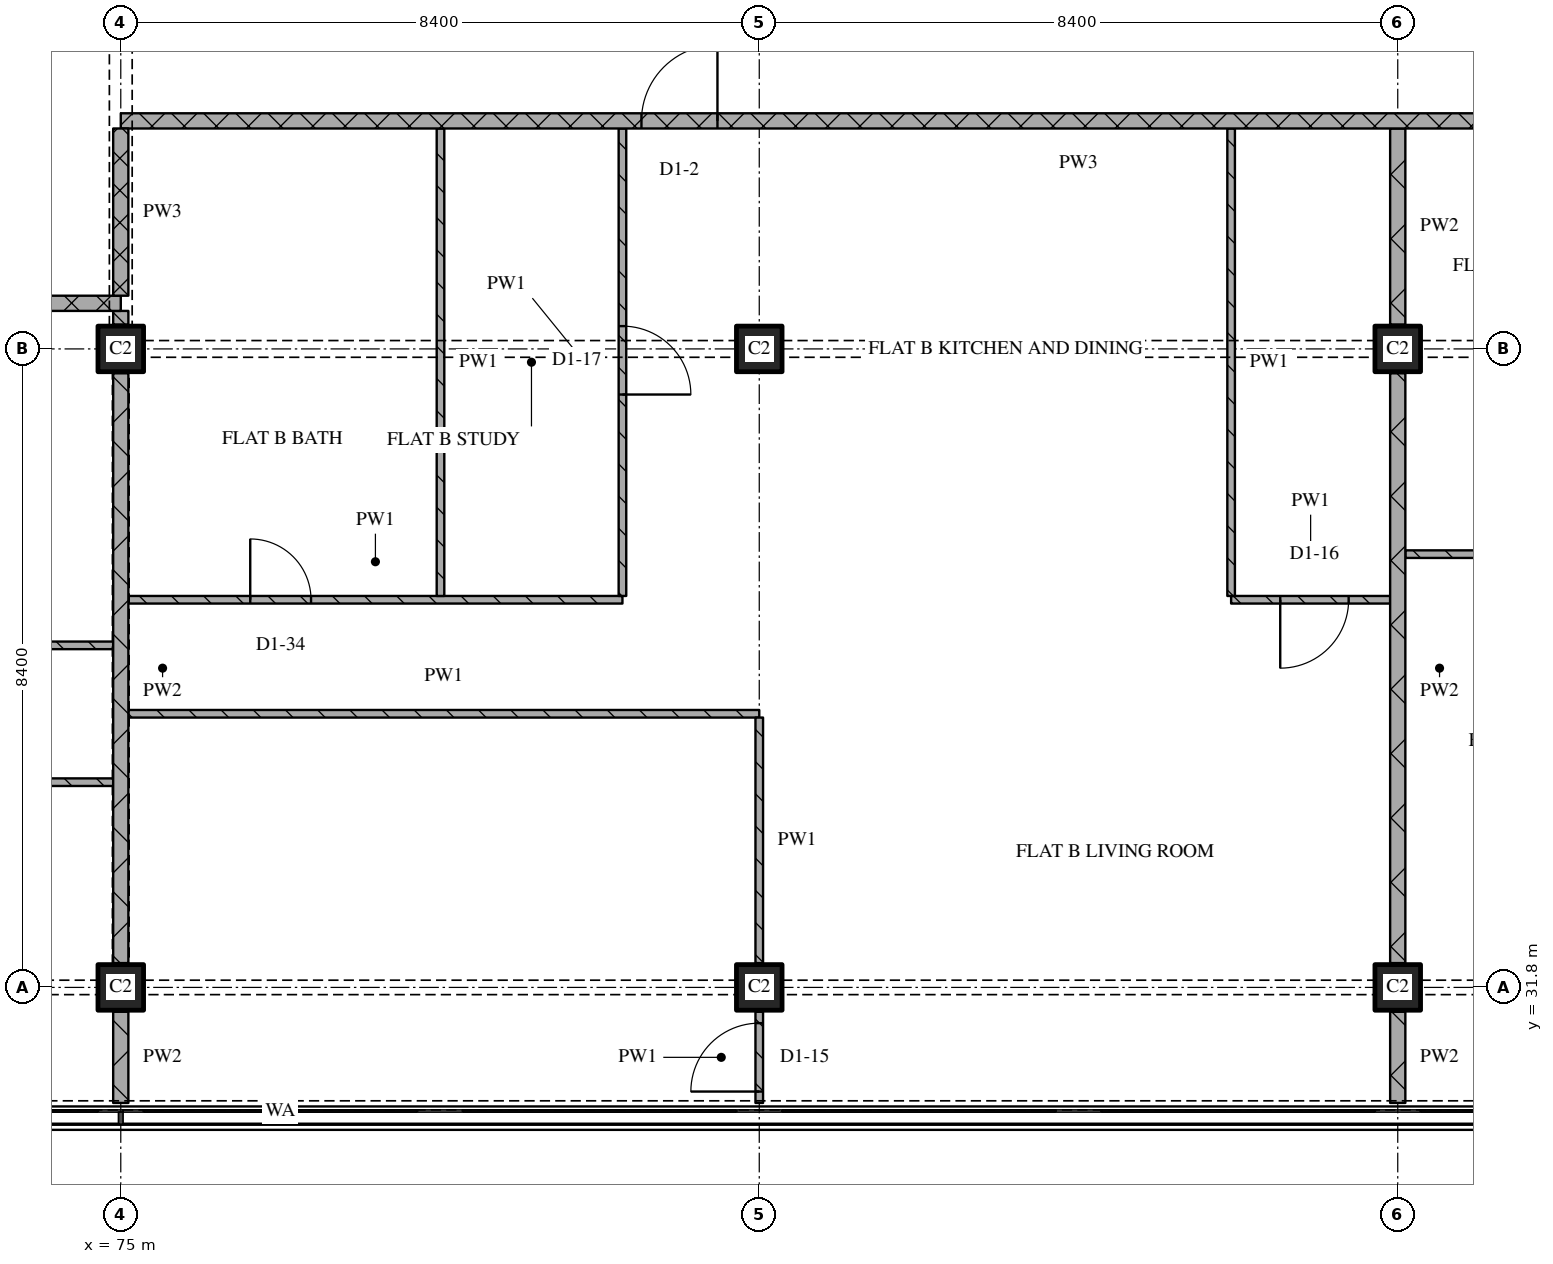
"""IFC4 building model, lengths in metres.
Left out: names, types, materials, properties, quantities, classifications, styles, units other than length and angle.
Written with IfcOpenShell. Run it as: python <this file> out.ifc"""

import sys

from ifc_helpers import new_model, si_unit, direction, frame, frame_2d, origin, origin_2d, place, context, subcontext, project, spatial, rectangle, extrude, element, fill, save


model = new_model("IFC4")
c1 = context("Model", 3, precision=1e-05, world=origin(), true_north=direction((0.0, 1.0)))
c2 = subcontext(c1, "Body", "Model", "MODEL_VIEW")
j1 = project(units=[si_unit("LENGTHUNIT", "METRE"), si_unit("PLANEANGLEUNIT", "RADIAN")], contexts=[c1])
p1 = place(None, origin())
s1 = spatial("IfcSite", under=j1, at=p1, CompositionType="ELEMENT")
p2 = place(p1, origin())
s2 = spatial("IfcBuilding", under=s1, at=p2, CompositionType="ELEMENT")
p3 = place(p2, frame((0.0, 0.0, 209.1)))
s3 = spatial("IfcBuildingStorey", under=s2, at=p3, CompositionType="ELEMENT", Elevation=209.1)
for number, where, z_axis, x_axis in (
    (1, (75.0, 31.8, 0.0), (0.0, 0.0, 1.0), (1.0, 0.0, 0.0)),
    (2, (75.0, 40.2, 0.0), (0.0, 0.0, 1.0), (1.0, 0.0, 0.0)),
    (3, (83.4, 31.8, 0.0), (0.0, 0.0, 1.0), (1.0, 0.0, 0.0)),
    (4, (83.4, 40.2, 0.0), (0.0, 0.0, 1.0), (1.0, 0.0, 0.0)),
    (5, (91.8, 31.8, 0.0), (0.0, 0.0, 1.0), (1.0, 0.0, 0.0)),
    (6, (91.8, 40.2, 0.0), (0.0, 0.0, 1.0), (1.0, 0.0, 0.0)),
):
    element("IfcColumn", number, at=place(p3, frame(where, z_axis=z_axis, x_axis=x_axis)), inside=s3, PredefinedType="COLUMN", context=c2, shape_type="SweptSolid", body=[
        extrude(rectangle(XDim=0.6, YDim=0.6, at=origin_2d()), origin(), (0.0, 0.0, 1.0), 3.6),
    ])
p4 = place(p3, frame((74.9, 34.5, 0.0), z_axis=(0.0, 0.0, 1.0), x_axis=(-1.0, 0.0, 0.0)))
e7 = element("IfcWall", 7, at=p4, inside=s3, PredefinedType="PARTITIONING", context=c2, shape_type="SweptSolid", body=[
    extrude(rectangle(XDim=12.5, YDim=0.1, at=frame_2d((6.25, 0.0))), origin(), (0.0, 0.0, 1.0), 3.32),
])
p5 = place(p4, frame((1.55, 0.0, 0.0)))
e8 = element("IfcOpeningElement", 8, at=p5, cuts=e7, PredefinedType="OPENING", context=c2, shape_type="SweptSolid", body=[
    extrude(rectangle(XDim=0.9, YDim=2.1, at=frame_2d((0.45, 1.05))), frame((0.0, 0.06, 0.0), z_axis=(0.0, -1.0, 0.0), x_axis=(1.0, 0.0, 0.0)), (0.0, 0.0, 1.0), 0.12),
])
p6 = place(p4, frame((7.85, 0.0, 0.0)))
e9 = element("IfcOpeningElement", 9, at=p6, cuts=e7, PredefinedType="OPENING", context=c2, shape_type="SweptSolid", body=[
    extrude(rectangle(XDim=0.9, YDim=2.1, at=frame_2d((0.45, 1.05))), frame((0.0, 0.06, 0.0), z_axis=(0.0, -1.0, 0.0), x_axis=(1.0, 0.0, 0.0)), (0.0, 0.0, 1.0), 0.12),
])
p7 = place(p3, frame((75.1, 35.4, 0.0), z_axis=(0.0, 0.0, 1.0), x_axis=(1.0, 0.0, 0.0)))
e10 = element("IfcWall", 10, at=p7, inside=s3, PredefinedType="PARTITIONING", context=c2, shape_type="SweptSolid", body=[
    extrude(rectangle(XDim=8.3, YDim=0.1, at=frame_2d((4.15, 0.0))), origin(), (0.0, 0.0, 1.0), 3.32),
])
p8 = place(p3, frame((68.4, 36.3, 0.0), z_axis=(0.0, 0.0, 1.0), x_axis=(1.0, 0.0, 0.0)))
e11 = element("IfcWall", 11, at=p8, inside=s3, PredefinedType="PARTITIONING", context=c2, shape_type="SweptSolid", body=[
    extrude(rectangle(XDim=6.5, YDim=0.1, at=frame_2d((3.25, 0.0))), origin(), (0.0, 0.0, 1.0), 3.32),
])
p9 = place(p8, frame((2.85, 0.0, 0.0)))
e12 = element("IfcOpeningElement", 12, at=p9, cuts=e11, PredefinedType="OPENING", context=c2, shape_type="SweptSolid", body=[
    extrude(rectangle(XDim=0.9, YDim=2.1, at=frame_2d((0.45, 1.05))), frame((0.0, 0.06, 0.0), z_axis=(0.0, -1.0, 0.0), x_axis=(1.0, 0.0, 0.0)), (0.0, 0.0, 1.0), 0.12),
])
p10 = place(p3, frame((75.1, 36.9, 0.0), z_axis=(0.0, 0.0, 1.0), x_axis=(1.0, 0.0, 0.0)))
e13 = element("IfcWall", 13, at=p10, inside=s3, PredefinedType="PARTITIONING", context=c2, shape_type="SweptSolid", body=[
    extrude(rectangle(XDim=6.5, YDim=0.1, at=frame_2d((3.25, 0.0))), origin(), (0.0, 0.0, 1.0), 3.32),
])
p11 = place(p10, frame((1.603, 0.0, 0.0)))
e14 = element("IfcOpeningElement", 14, at=p11, cuts=e13, PredefinedType="OPENING", context=c2, shape_type="SweptSolid", body=[
    extrude(rectangle(XDim=0.8, YDim=2.1, at=frame_2d((0.4, 1.05))), frame((0.0, 0.06, 0.0), z_axis=(0.0, -1.0, 0.0), x_axis=(1.0, 0.0, 0.0)), (0.0, 0.0, 1.0), 0.12),
])
p12 = place(p3, frame((89.608, 36.9, 0.0), z_axis=(0.0, 0.0, 1.0), x_axis=(1.0, 0.0, 0.0)))
e15 = element("IfcWall", 15, at=p12, inside=s3, PredefinedType="PARTITIONING", context=c2, shape_type="SweptSolid", body=[
    extrude(rectangle(XDim=2.092, YDim=0.1, at=frame_2d((1.046, 0.0))), origin(), (0.0, 0.0, 1.0), 3.32),
])
p13 = place(p12, frame((0.646, 0.0, 0.0)))
e16 = element("IfcOpeningElement", 16, at=p13, cuts=e15, PredefinedType="OPENING", context=c2, shape_type="SweptSolid", body=[
    extrude(rectangle(XDim=0.9, YDim=2.1, at=frame_2d((0.45, 1.05))), frame((0.0, 0.06, 0.0), z_axis=(0.0, -1.0, 0.0), x_axis=(1.0, 0.0, 0.0)), (0.0, 0.0, 1.0), 0.12),
])
p14 = place(p3, frame((91.9, 37.5, 0.0), z_axis=(0.0, 0.0, 1.0), x_axis=(1.0, 0.0, 0.0)))
e17 = element("IfcWall", 17, at=p14, inside=s3, PredefinedType="PARTITIONING", context=c2, shape_type="SweptSolid", body=[
    extrude(rectangle(XDim=2.9, YDim=0.1, at=frame_2d((1.45, 0.0))), origin(), (0.0, 0.0, 1.0), 3.32),
])
p15 = place(p14, frame((1.0, 0.0, 0.0)))
e18 = element("IfcOpeningElement", 18, at=p15, cuts=e17, PredefinedType="OPENING", context=c2, shape_type="SweptSolid", body=[
    extrude(rectangle(XDim=0.8, YDim=2.1, at=frame_2d((0.4, 1.05))), frame((0.0, 0.06, 0.0), z_axis=(0.0, -1.0, 0.0), x_axis=(1.0, 0.0, 0.0)), (0.0, 0.0, 1.0), 0.12),
])
p16 = place(p3, frame((75.0, 40.8, 0.0), z_axis=(0.0, 0.0, 1.0), x_axis=(-1.0, 0.0, 0.0)))
e19 = element("IfcWall", 19, at=p16, inside=s3, PredefinedType="PARTITIONING", context=c2, shape_type="SweptSolid", body=[
    extrude(rectangle(XDim=24.38, YDim=0.2, at=frame_2d((12.19, 0.0))), origin(), (0.0, 0.0, 1.0), 3.32),
])
p17 = place(p16, frame((14.35, 0.0, 0.0)))
e20 = element("IfcOpeningElement", 20, at=p17, cuts=e19, PredefinedType="OPENING", context=c2, shape_type="SweptSolid", body=[
    extrude(rectangle(XDim=1.0, YDim=2.1, at=frame_2d((0.5, 1.05))), frame((0.0, 0.11, 0.0), z_axis=(0.0, -1.0, 0.0), x_axis=(1.0, 0.0, 0.0)), (0.0, 0.0, 1.0), 0.22),
])
p18 = place(p3, frame((100.2, 43.2, 0.0), z_axis=(0.0, 0.0, 1.0), x_axis=(-1.0, 0.0, 0.0)))
e21 = element("IfcWall", 21, at=p18, inside=s3, PredefinedType="PARTITIONING", context=c2, shape_type="SweptSolid", body=[
    extrude(rectangle(XDim=25.2, YDim=0.2, at=frame_2d((12.6, 0.0))), origin(), (0.0, 0.0, 1.0), 3.32),
])
p19 = place(p18, frame((4.15, 0.0, 0.0)))
e22 = element("IfcOpeningElement", 22, at=p19, cuts=e21, PredefinedType="OPENING", context=c2, shape_type="SweptSolid", body=[
    extrude(rectangle(XDim=1.0, YDim=2.1, at=frame_2d((0.5, 1.05))), frame((0.0, 0.11, 0.0), z_axis=(0.0, -1.0, 0.0), x_axis=(1.0, 0.0, 0.0)), (0.0, 0.0, 1.0), 0.22),
])
p20 = place(p18, frame((17.35, 0.0, 0.0)))
e23 = element("IfcOpeningElement", 23, at=p20, cuts=e21, PredefinedType="OPENING", context=c2, shape_type="SweptSolid", body=[
    extrude(rectangle(XDim=1.0, YDim=2.1, at=frame_2d((0.5, 1.05))), frame((0.0, 0.11, 0.0), z_axis=(0.0, -1.0, 0.0), x_axis=(1.0, 0.0, 0.0)), (0.0, 0.0, 1.0), 0.22),
])
p21 = place(p3, frame((75.0, 43.1, 0.0), z_axis=(0.0, 0.0, 1.0), x_axis=(0.0, -1.0, 0.0)))
e24 = element("IfcWall", 24, at=p21, inside=s3, PredefinedType="PARTITIONING", context=c2, shape_type="SweptSolid", body=[
    extrude(rectangle(XDim=2.2, YDim=0.2, at=frame_2d((1.1, 0.0))), origin(), (0.0, 0.0, 1.0), 2.53),
])
p22 = place(p3, frame((75.0, 31.48, 0.0), z_axis=(0.0, 0.0, 1.0), x_axis=(0.0, -1.0, 0.0)))
e25 = element("IfcWall", 25, at=p22, inside=s3, PredefinedType="PARTITIONING", context=c2, shape_type="SweptSolid", body=[
    extrude(rectangle(XDim=1.2, YDim=0.2, at=frame_2d((0.6, 0.0))), origin(), (0.0, 0.0, 1.0), 3.32),
])
p23 = place(p3, frame((75.0, 39.88, 0.0), z_axis=(0.0, 0.0, 1.0), x_axis=(0.0, -1.0, 0.0)))
e26 = element("IfcWall", 26, at=p23, inside=s3, PredefinedType="PARTITIONING", context=c2, shape_type="SweptSolid", body=[
    extrude(rectangle(XDim=7.76, YDim=0.2, at=frame_2d((3.88, 0.0))), origin(), (0.0, 0.0, 1.0), 2.72),
])
p24 = place(p3, frame((75.0, 40.7, 0.0), z_axis=(0.0, 0.0, 1.0), x_axis=(0.0, -1.0, 0.0)))
e27 = element("IfcWall", 27, at=p24, inside=s3, PredefinedType="PARTITIONING", context=c2, shape_type="SweptSolid", body=[
    extrude(rectangle(XDim=0.18, YDim=0.2, at=frame_2d((0.09, 0.0))), origin(), (0.0, 0.0, 1.0), 3.32),
])
p25 = place(p3, frame((79.206, 43.1, 0.0), z_axis=(0.0, 0.0, 1.0), x_axis=(0.0, -1.0, 0.0)))
e28 = element("IfcWall", 28, at=p25, inside=s3, PredefinedType="PARTITIONING", context=c2, shape_type="SweptSolid", body=[
    extrude(rectangle(XDim=6.15, YDim=0.1, at=frame_2d((3.075, 0.0))), origin(), (0.0, 0.0, 1.0), 3.32),
])
p26 = place(p3, frame((81.6, 36.95, 0.0), z_axis=(0.0, 0.0, 1.0), x_axis=(0.0, 1.0, 0.0)))
e29 = element("IfcWall", 29, at=p26, inside=s3, PredefinedType="PARTITIONING", context=c2, shape_type="SweptSolid", body=[
    extrude(rectangle(XDim=6.15, YDim=0.1, at=frame_2d((3.075, 0.0))), origin(), (0.0, 0.0, 1.0), 3.32),
])
p27 = place(p26, frame((2.65, 0.0, 0.0)))
e30 = element("IfcOpeningElement", 30, at=p27, cuts=e29, PredefinedType="OPENING", context=c2, shape_type="SweptSolid", body=[
    extrude(rectangle(XDim=0.9, YDim=2.1, at=frame_2d((0.45, 1.05))), frame((0.0, 0.06, 0.0), z_axis=(0.0, -1.0, 0.0), x_axis=(1.0, 0.0, 0.0)), (0.0, 0.0, 1.0), 0.12),
])
p28 = place(p3, frame((83.4, 30.28, 0.0), z_axis=(0.0, 0.0, 1.0), x_axis=(0.0, 1.0, 0.0)))
e31 = element("IfcWall", 31, at=p28, inside=s3, PredefinedType="PARTITIONING", context=c2, shape_type="SweptSolid", body=[
    extrude(rectangle(XDim=1.2, YDim=0.1, at=frame_2d((0.6, 0.0))), origin(), (0.0, 0.0, 1.0), 3.32),
])
p29 = place(p28, frame((0.15, 0.0, 0.0)))
e32 = element("IfcOpeningElement", 32, at=p29, cuts=e31, PredefinedType="OPENING", context=c2, shape_type="SweptSolid", body=[
    extrude(rectangle(XDim=0.9, YDim=2.1, at=frame_2d((0.45, 1.05))), frame((0.0, 0.06, 0.0), z_axis=(0.0, -1.0, 0.0), x_axis=(1.0, 0.0, 0.0)), (0.0, 0.0, 1.0), 0.12),
])
p30 = place(p3, frame((83.4, 35.35, 0.0), z_axis=(0.0, 0.0, 1.0), x_axis=(0.0, -1.0, 0.0)))
e33 = element("IfcWall", 33, at=p30, inside=s3, PredefinedType="PARTITIONING", context=c2, shape_type="SweptSolid", body=[
    extrude(rectangle(XDim=3.23, YDim=0.1, at=frame_2d((1.615, 0.0))), origin(), (0.0, 0.0, 1.0), 3.32),
])
p31 = place(p3, frame((89.608, 43.1, 0.0), z_axis=(0.0, 0.0, 1.0), x_axis=(0.0, -1.0, 0.0)))
e34 = element("IfcWall", 34, at=p31, inside=s3, PredefinedType="PARTITIONING", context=c2, shape_type="SweptSolid", body=[
    extrude(rectangle(XDim=6.15, YDim=0.1, at=frame_2d((3.075, 0.0))), origin(), (0.0, 0.0, 1.0), 3.32),
])
p32 = place(p3, frame((91.8, 31.48, 0.0), z_axis=(0.0, 0.0, 1.0), x_axis=(0.0, -1.0, 0.0)))
e35 = element("IfcWall", 35, at=p32, inside=s3, PredefinedType="PARTITIONING", context=c2, shape_type="SweptSolid", body=[
    extrude(rectangle(XDim=1.2, YDim=0.2, at=frame_2d((0.6, 0.0))), origin(), (0.0, 0.0, 1.0), 3.32),
])
p33 = place(p3, frame((91.8, 39.88, 0.0), z_axis=(0.0, 0.0, 1.0), x_axis=(0.0, -1.0, 0.0)))
e36 = element("IfcWall", 36, at=p33, inside=s3, PredefinedType="PARTITIONING", context=c2, shape_type="SweptSolid", body=[
    extrude(rectangle(XDim=7.76, YDim=0.2, at=frame_2d((3.88, 0.0))), origin(), (0.0, 0.0, 1.0), 3.32),
])
p34 = place(p3, frame((91.8, 43.1, 0.0), z_axis=(0.0, 0.0, 1.0), x_axis=(0.0, -1.0, 0.0)))
e37 = element("IfcWall", 37, at=p34, inside=s3, PredefinedType="PARTITIONING", context=c2, shape_type="SweptSolid", body=[
    extrude(rectangle(XDim=2.58, YDim=0.2, at=frame_2d((1.29, 0.0))), origin(), (0.0, 0.0, 1.0), 3.32),
])
p35 = place(p11, origin())
e38 = element("IfcDoor", 38, at=p35, inside=s3, OperationType="SINGLE_SWING_LEFT", PredefinedType="DOOR", context=c2, shape_type="SweptSolid", body=[
    extrude(rectangle(XDim=0.8, YDim=2.1, at=frame_2d((0.4, 1.05))), frame((0.0, 0.025, 0.0), z_axis=(0.0, -1.0, 0.0), x_axis=(1.0, 0.0, 0.0)), (0.0, 0.0, 1.0), 0.05),
])
fill(e14, e38)
p36 = place(p13, origin())
e39 = element("IfcDoor", 39, at=p36, inside=s3, OperationType="SINGLE_SWING_RIGHT", PredefinedType="DOOR", context=c2, shape_type="SweptSolid", body=[
    extrude(rectangle(XDim=0.9, YDim=2.1, at=frame_2d((0.45, 1.05))), frame((0.0, 0.025, 0.0), z_axis=(0.0, -1.0, 0.0), x_axis=(1.0, 0.0, 0.0)), (0.0, 0.0, 1.0), 0.05),
])
fill(e16, e39)
p37 = place(p20, origin())
e40 = element("IfcDoor", 40, at=p37, inside=s3, OperationType="SINGLE_SWING_RIGHT", PredefinedType="DOOR", context=c2, shape_type="SweptSolid", body=[
    extrude(rectangle(XDim=1.0, YDim=2.1, at=frame_2d((0.5, 1.05))), frame((0.0, 0.025, 0.0), z_axis=(0.0, -1.0, 0.0), x_axis=(1.0, 0.0, 0.0)), (0.0, 0.0, 1.0), 0.05),
])
fill(e23, e40)
p38 = place(p27, origin())
e41 = element("IfcDoor", 41, at=p38, inside=s3, OperationType="SINGLE_SWING_RIGHT", PredefinedType="DOOR", context=c2, shape_type="SweptSolid", body=[
    extrude(rectangle(XDim=0.9, YDim=2.1, at=frame_2d((0.45, 1.05))), frame((0.0, 0.025, 0.0), z_axis=(0.0, -1.0, 0.0), x_axis=(1.0, 0.0, 0.0)), (0.0, 0.0, 1.0), 0.05),
])
fill(e30, e41)
p39 = place(p29, origin())
e42 = element("IfcDoor", 42, at=p39, inside=s3, OperationType="SINGLE_SWING_LEFT", PredefinedType="DOOR", context=c2, shape_type="SweptSolid", body=[
    extrude(rectangle(XDim=0.9, YDim=2.1, at=frame_2d((0.45, 1.05))), frame((0.0, 0.025, 0.0), z_axis=(0.0, -1.0, 0.0), x_axis=(1.0, 0.0, 0.0)), (0.0, 0.0, 1.0), 0.05),
])
fill(e32, e42)
save(model, sys.argv[1])
